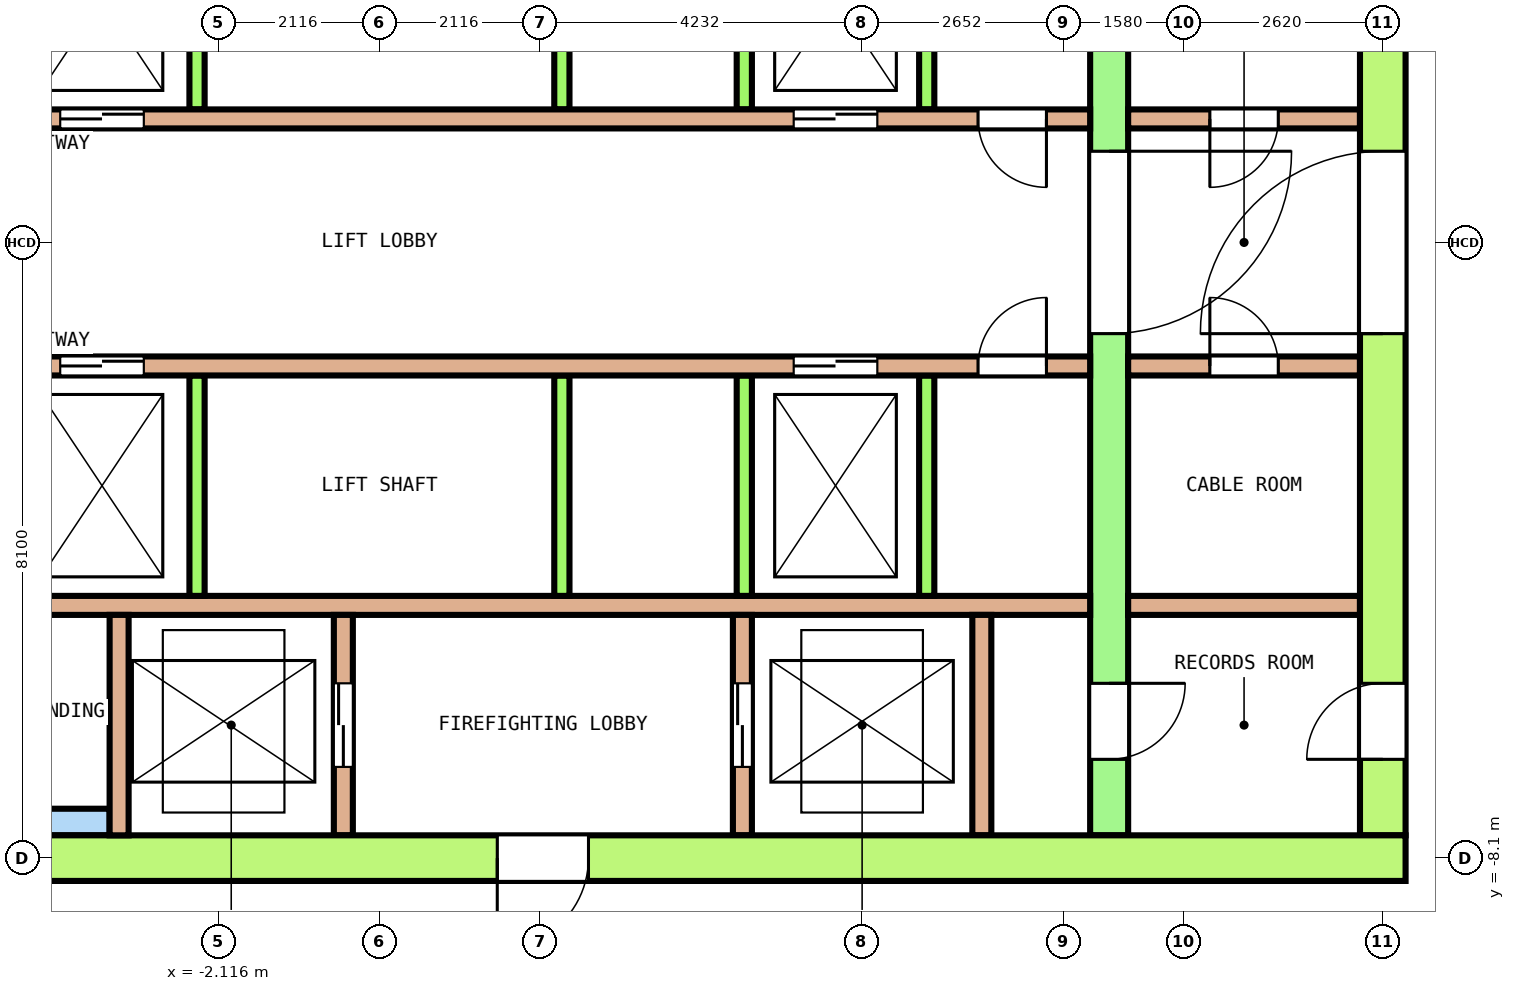
"""IFC4 building model, lengths in metres.
Left out: names, types, materials, properties, quantities, classifications, styles, units other than length and angle.
Written with IfcOpenShell. Run it as: python <this file> out.ifc"""

import sys

from ifc_helpers import new_model, si_unit, direction, frame, frame_2d, origin, place, context, subcontext, project, spatial, rectangle, extrude, element, fill, save


model = new_model("IFC4")
c1 = context("Model", 3, precision=1e-05, world=origin(), true_north=direction((0.0, 1.0)))
c2 = subcontext(c1, "Body", "Model", "MODEL_VIEW")
j1 = project(units=[si_unit("LENGTHUNIT", "METRE"), si_unit("PLANEANGLEUNIT", "RADIAN")], contexts=[c1])
p1 = place(None, origin())
s1 = spatial("IfcSite", under=j1, at=p1, CompositionType="ELEMENT")
p2 = place(p1, origin())
s2 = spatial("IfcBuilding", under=s1, at=p2, CompositionType="ELEMENT")
p3 = place(p2, frame((0.0, 0.0, 219.4)))
s3 = spatial("IfcBuildingStorey", under=s2, at=p3, CompositionType="ELEMENT", Elevation=219.4)
p4 = place(p3, frame((-13.5, -8.1, 0.0), z_axis=(0.0, 0.0, 1.0), x_axis=(1.0, 0.0, 0.0)))
e1 = element("IfcWall", 1, at=p4, inside=s3, PredefinedType="SHEAR", context=c2, shape_type="SweptSolid", body=[
    extrude(rectangle(XDim=27.0, YDim=0.6, at=frame_2d((13.5, 0.0))), origin(), (0.0, 0.0, 1.0), 3.7),
])
p5 = place(p4, frame((15.05, 0.0, 0.0)))
e2 = element("IfcOpeningElement", 2, at=p5, cuts=e1, PredefinedType="OPENING", context=c2, shape_type="SweptSolid", body=[
    extrude(rectangle(XDim=1.2, YDim=2.1, at=frame_2d((0.6, 1.05))), frame((0.0, 0.31, 0.0), z_axis=(0.0, -1.0, 0.0), x_axis=(1.0, 0.0, 0.0)), (0.0, 0.0, 1.0), 0.62),
])
p6 = place(p3, frame((13.2, -7.8, 0.0), z_axis=(0.0, 0.0, 1.0), x_axis=(0.0, 1.0, 0.0)))
e3 = element("IfcWall", 3, at=p6, inside=s3, PredefinedType="SHEAR", context=c2, shape_type="SweptSolid", body=[
    extrude(rectangle(XDim=15.6, YDim=0.6, at=frame_2d((7.8, 0.0))), origin(), (0.0, 0.0, 1.0), 3.7),
])
p7 = place(p6, frame((6.6, 0.0, 0.0)))
e4 = element("IfcOpeningElement", 4, at=p7, cuts=e3, PredefinedType="OPENING", context=c2, shape_type="SweptSolid", body=[
    extrude(rectangle(XDim=2.4, YDim=2.1, at=frame_2d((1.2, 1.05))), frame((0.0, 0.31, 0.0), z_axis=(0.0, -1.0, 0.0), x_axis=(1.0, 0.0, 0.0)), (0.0, 0.0, 1.0), 0.62),
])
p8 = place(p6, frame((13.5, 0.0, 0.0)))
e5 = element("IfcOpeningElement", 5, at=p8, cuts=e3, PredefinedType="OPENING", context=c2, shape_type="SweptSolid", body=[
    extrude(rectangle(XDim=1.2, YDim=2.1, at=frame_2d((0.6, 1.05))), frame((0.0, 0.31, 0.0), z_axis=(0.0, -1.0, 0.0), x_axis=(1.0, 0.0, 0.0)), (0.0, 0.0, 1.0), 0.62),
])
p9 = place(p6, frame((1.0, 0.0, 0.0)))
e6 = element("IfcOpeningElement", 6, at=p9, cuts=e3, PredefinedType="OPENING", context=c2, shape_type="SweptSolid", body=[
    extrude(rectangle(XDim=1.0, YDim=2.1, at=frame_2d((0.5, 1.05))), frame((0.0, 0.31, 0.0), z_axis=(0.0, -1.0, 0.0), x_axis=(1.0, 0.0, 0.0)), (0.0, 0.0, 1.0), 0.62),
])
p10 = place(p3, frame((9.6, -7.8, 0.0), z_axis=(0.0, 0.0, 1.0), x_axis=(0.0, 1.0, 0.0)))
e7 = element("IfcWall", 7, at=p10, inside=s3, PredefinedType="SHEAR", context=c2, shape_type="SweptSolid", body=[
    extrude(rectangle(XDim=15.6, YDim=0.5, at=frame_2d((7.8, 0.0))), origin(), (0.0, 0.0, 1.0), 3.7),
])
p11 = place(p10, frame((6.6, 0.0, 0.0)))
e8 = element("IfcOpeningElement", 8, at=p11, cuts=e7, PredefinedType="OPENING", context=c2, shape_type="SweptSolid", body=[
    extrude(rectangle(XDim=2.4, YDim=2.1, at=frame_2d((1.2, 1.05))), frame((0.0, 0.26, 0.0), z_axis=(0.0, -1.0, 0.0), x_axis=(1.0, 0.0, 0.0)), (0.0, 0.0, 1.0), 0.52),
])
p12 = place(p10, frame((13.5, 0.0, 0.0)))
e9 = element("IfcOpeningElement", 9, at=p12, cuts=e7, PredefinedType="OPENING", context=c2, shape_type="SweptSolid", body=[
    extrude(rectangle(XDim=1.2, YDim=2.1, at=frame_2d((0.6, 1.05))), frame((0.0, 0.26, 0.0), z_axis=(0.0, -1.0, 0.0), x_axis=(1.0, 0.0, 0.0)), (0.0, 0.0, 1.0), 0.52),
])
p13 = place(p10, frame((1.0, 0.0, 0.0)))
e10 = element("IfcOpeningElement", 10, at=p13, cuts=e7, PredefinedType="OPENING", context=c2, shape_type="SweptSolid", body=[
    extrude(rectangle(XDim=1.0, YDim=2.1, at=frame_2d((0.5, 1.05))), frame((0.0, 0.26, 0.0), z_axis=(0.0, -1.0, 0.0), x_axis=(1.0, 0.0, 0.0)), (0.0, 0.0, 1.0), 0.52),
])
p14 = place(p3, frame((-9.35, 1.625, 0.0), z_axis=(0.0, 0.0, 1.0), x_axis=(1.0, 0.0, 0.0)))
e11 = element("IfcWall", 11, at=p14, inside=s3, PredefinedType="SOLIDWALL", context=c2, shape_type="SweptSolid", body=[
    extrude(rectangle(XDim=18.7, YDim=0.25, at=frame_2d((9.35, 0.0))), origin(), (0.0, 0.0, 1.0), 3.7),
])
p15 = place(p14, frame((2.85, 0.0, 0.0)))
e12 = element("IfcOpeningElement", 12, at=p15, cuts=e11, PredefinedType="OPENING", context=c2, shape_type="SweptSolid", body=[
    extrude(rectangle(XDim=1.1, YDim=2.1, at=frame_2d((0.55, 1.05))), frame((0.0, 0.135, 0.0), z_axis=(0.0, -1.0, 0.0), x_axis=(1.0, 0.0, 0.0)), (0.0, 0.0, 1.0), 0.27),
])
p16 = place(p14, frame((5.15, 0.0, 0.0)))
e13 = element("IfcOpeningElement", 13, at=p16, cuts=e11, PredefinedType="OPENING", context=c2, shape_type="SweptSolid", body=[
    extrude(rectangle(XDim=1.1, YDim=2.1, at=frame_2d((0.55, 1.05))), frame((0.0, 0.135, 0.0), z_axis=(0.0, -1.0, 0.0), x_axis=(1.0, 0.0, 0.0)), (0.0, 0.0, 1.0), 0.27),
])
p17 = place(p14, frame((14.8, 0.0, 0.0)))
e14 = element("IfcOpeningElement", 14, at=p17, cuts=e11, PredefinedType="OPENING", context=c2, shape_type="SweptSolid", body=[
    extrude(rectangle(XDim=1.1, YDim=2.1, at=frame_2d((0.55, 1.05))), frame((0.0, 0.135, 0.0), z_axis=(0.0, -1.0, 0.0), x_axis=(1.0, 0.0, 0.0)), (0.0, 0.0, 1.0), 0.27),
])
p18 = place(p14, frame((0.575, 0.0, 0.0)))
e15 = element("IfcOpeningElement", 15, at=p18, cuts=e11, PredefinedType="OPENING", context=c2, shape_type="SweptSolid", body=[
    extrude(rectangle(XDim=0.9, YDim=2.1, at=frame_2d((0.45, 1.05))), frame((0.0, 0.135, 0.0), z_axis=(0.0, -1.0, 0.0), x_axis=(1.0, 0.0, 0.0)), (0.0, 0.0, 1.0), 0.27),
])
p19 = place(p14, frame((17.225, 0.0, 0.0)))
e16 = element("IfcOpeningElement", 16, at=p19, cuts=e11, PredefinedType="OPENING", context=c2, shape_type="SweptSolid", body=[
    extrude(rectangle(XDim=0.9, YDim=2.1, at=frame_2d((0.45, 1.05))), frame((0.0, 0.135, 0.0), z_axis=(0.0, -1.0, 0.0), x_axis=(1.0, 0.0, 0.0)), (0.0, 0.0, 1.0), 0.27),
])
p20 = place(p3, frame((9.85, 1.625, 0.0), z_axis=(0.0, 0.0, 1.0), x_axis=(1.0, 0.0, 0.0)))
e17 = element("IfcWall", 17, at=p20, inside=s3, PredefinedType="SOLIDWALL", context=c2, shape_type="SweptSolid", body=[
    extrude(rectangle(XDim=3.05, YDim=0.25, at=frame_2d((1.525, 0.0))), origin(), (0.0, 0.0, 1.0), 3.7),
])
p21 = place(p20, frame((1.075, 0.0, 0.0)))
e18 = element("IfcOpeningElement", 18, at=p21, cuts=e17, PredefinedType="OPENING", context=c2, shape_type="SweptSolid", body=[
    extrude(rectangle(XDim=0.9, YDim=2.1, at=frame_2d((0.45, 1.05))), frame((0.0, 0.135, 0.0), z_axis=(0.0, -1.0, 0.0), x_axis=(1.0, 0.0, 0.0)), (0.0, 0.0, 1.0), 0.27),
])
for number, where, z_axis, x_axis in (
    (19, (-2.4, 1.75, 0.0), (0.0, 0.0, 1.0), (0.0, 1.0, 0.0)),
    (20, (2.4, 1.75, 0.0), (0.0, 0.0, 1.0), (0.0, 1.0, 0.0)),
    (21, (4.8, 1.75, 0.0), (0.0, 0.0, 1.0), (0.0, 1.0, 0.0)),
    (22, (7.2, 1.75, 0.0), (0.0, 0.0, 1.0), (0.0, 1.0, 0.0)),
):
    element("IfcWall", number, at=place(p3, frame(where, z_axis=z_axis, x_axis=x_axis)), inside=s3, PredefinedType="SOLIDWALL", context=c2, shape_type="SweptSolid", body=[
        extrude(rectangle(XDim=2.9, YDim=0.2, at=frame_2d((1.45, 0.0))), origin(), (0.0, 0.0, 1.0), 3.7),
    ])
p22 = place(p3, frame((-9.35, -1.625, 0.0), z_axis=(0.0, 0.0, 1.0), x_axis=(1.0, 0.0, 0.0)))
e23 = element("IfcWall", 23, at=p22, inside=s3, PredefinedType="SOLIDWALL", context=c2, shape_type="SweptSolid", body=[
    extrude(rectangle(XDim=18.7, YDim=0.25, at=frame_2d((9.35, 0.0))), origin(), (0.0, 0.0, 1.0), 3.7),
])
p23 = place(p22, frame((2.85, 0.0, 0.0)))
e24 = element("IfcOpeningElement", 24, at=p23, cuts=e23, PredefinedType="OPENING", context=c2, shape_type="SweptSolid", body=[
    extrude(rectangle(XDim=1.1, YDim=2.1, at=frame_2d((0.55, 1.05))), frame((0.0, 0.135, 0.0), z_axis=(0.0, -1.0, 0.0), x_axis=(1.0, 0.0, 0.0)), (0.0, 0.0, 1.0), 0.27),
])
p24 = place(p22, frame((5.15, 0.0, 0.0)))
e25 = element("IfcOpeningElement", 25, at=p24, cuts=e23, PredefinedType="OPENING", context=c2, shape_type="SweptSolid", body=[
    extrude(rectangle(XDim=1.1, YDim=2.1, at=frame_2d((0.55, 1.05))), frame((0.0, 0.135, 0.0), z_axis=(0.0, -1.0, 0.0), x_axis=(1.0, 0.0, 0.0)), (0.0, 0.0, 1.0), 0.27),
])
p25 = place(p22, frame((14.8, 0.0, 0.0)))
e26 = element("IfcOpeningElement", 26, at=p25, cuts=e23, PredefinedType="OPENING", context=c2, shape_type="SweptSolid", body=[
    extrude(rectangle(XDim=1.1, YDim=2.1, at=frame_2d((0.55, 1.05))), frame((0.0, 0.135, 0.0), z_axis=(0.0, -1.0, 0.0), x_axis=(1.0, 0.0, 0.0)), (0.0, 0.0, 1.0), 0.27),
])
p26 = place(p22, frame((0.575, 0.0, 0.0)))
e27 = element("IfcOpeningElement", 27, at=p26, cuts=e23, PredefinedType="OPENING", context=c2, shape_type="SweptSolid", body=[
    extrude(rectangle(XDim=0.9, YDim=2.1, at=frame_2d((0.45, 1.05))), frame((0.0, 0.135, 0.0), z_axis=(0.0, -1.0, 0.0), x_axis=(1.0, 0.0, 0.0)), (0.0, 0.0, 1.0), 0.27),
])
p27 = place(p22, frame((17.225, 0.0, 0.0)))
e28 = element("IfcOpeningElement", 28, at=p27, cuts=e23, PredefinedType="OPENING", context=c2, shape_type="SweptSolid", body=[
    extrude(rectangle(XDim=0.9, YDim=2.1, at=frame_2d((0.45, 1.05))), frame((0.0, 0.135, 0.0), z_axis=(0.0, -1.0, 0.0), x_axis=(1.0, 0.0, 0.0)), (0.0, 0.0, 1.0), 0.27),
])
p28 = place(p3, frame((9.85, -1.625, 0.0), z_axis=(0.0, 0.0, 1.0), x_axis=(1.0, 0.0, 0.0)))
e29 = element("IfcWall", 29, at=p28, inside=s3, PredefinedType="SOLIDWALL", context=c2, shape_type="SweptSolid", body=[
    extrude(rectangle(XDim=3.05, YDim=0.25, at=frame_2d((1.525, 0.0))), origin(), (0.0, 0.0, 1.0), 3.7),
])
p29 = place(p28, frame((1.075, 0.0, 0.0)))
e30 = element("IfcOpeningElement", 30, at=p29, cuts=e29, PredefinedType="OPENING", context=c2, shape_type="SweptSolid", body=[
    extrude(rectangle(XDim=0.9, YDim=2.1, at=frame_2d((0.45, 1.05))), frame((0.0, 0.135, 0.0), z_axis=(0.0, -1.0, 0.0), x_axis=(1.0, 0.0, 0.0)), (0.0, 0.0, 1.0), 0.27),
])
p30 = place(p3, frame((-9.35, -4.775, 0.0), z_axis=(0.0, 0.0, 1.0), x_axis=(1.0, 0.0, 0.0)))
e31 = element("IfcWall", 31, at=p30, inside=s3, PredefinedType="SOLIDWALL", context=c2, shape_type="SweptSolid", body=[
    extrude(rectangle(XDim=18.7, YDim=0.25, at=frame_2d((9.35, 0.0))), origin(), (0.0, 0.0, 1.0), 3.7),
])
p31 = place(p3, frame((9.85, -4.775, 0.0), z_axis=(0.0, 0.0, 1.0), x_axis=(1.0, 0.0, 0.0)))
e32 = element("IfcWall", 32, at=p31, inside=s3, PredefinedType="SOLIDWALL", context=c2, shape_type="SweptSolid", body=[
    extrude(rectangle(XDim=3.05, YDim=0.25, at=frame_2d((1.525, 0.0))), origin(), (0.0, 0.0, 1.0), 3.7),
])
for number, where, z_axis, x_axis in (
    (33, (-2.4, -4.65, 0.0), (0.0, 0.0, 1.0), (0.0, 1.0, 0.0)),
    (34, (2.4, -4.65, 0.0), (0.0, 0.0, 1.0), (0.0, 1.0, 0.0)),
    (35, (4.8, -4.65, 0.0), (0.0, 0.0, 1.0), (0.0, 1.0, 0.0)),
    (36, (7.2, -4.65, 0.0), (0.0, 0.0, 1.0), (0.0, 1.0, 0.0)),
):
    element("IfcWall", number, at=place(p3, frame(where, z_axis=z_axis, x_axis=x_axis)), inside=s3, PredefinedType="SOLIDWALL", context=c2, shape_type="SweptSolid", body=[
        extrude(rectangle(XDim=2.9, YDim=0.2, at=frame_2d((1.45, 0.0))), origin(), (0.0, 0.0, 1.0), 3.7),
    ])
p32 = place(p3, frame((-9.35, -7.625, 0.0), z_axis=(0.0, 0.0, 1.0), x_axis=(1.0, 0.0, 0.0)))
e37 = element("IfcWall", 37, at=p32, inside=s3, PredefinedType="SOLIDWALL", context=c2, shape_type="SweptSolid", body=[
    extrude(rectangle(XDim=5.8, YDim=0.35, at=frame_2d((2.9, 0.0))), origin(), (0.0, 0.0, 1.0), 3.7),
])
p33 = place(p3, frame((-3.425, -7.8, 0.0), z_axis=(0.0, 0.0, 1.0), x_axis=(0.0, 1.0, 0.0)))
e38 = element("IfcWall", 38, at=p33, inside=s3, PredefinedType="SOLIDWALL", context=c2, shape_type="SweptSolid", body=[
    extrude(rectangle(XDim=2.9, YDim=0.25, at=frame_2d((1.45, 0.0))), origin(), (0.0, 0.0, 1.0), 3.7),
])
p34 = place(p3, frame((-0.475, -7.8, 0.0), z_axis=(0.0, 0.0, 1.0), x_axis=(0.0, 1.0, 0.0)))
e39 = element("IfcWall", 39, at=p34, inside=s3, PredefinedType="SOLIDWALL", context=c2, shape_type="SweptSolid", body=[
    extrude(rectangle(XDim=2.9, YDim=0.25, at=frame_2d((1.45, 0.0))), origin(), (0.0, 0.0, 1.0), 3.7),
])
p35 = place(p34, frame((0.9, 0.0, 0.0)))
e40 = element("IfcOpeningElement", 40, at=p35, cuts=e39, PredefinedType="OPENING", context=c2, shape_type="SweptSolid", body=[
    extrude(rectangle(XDim=1.1, YDim=2.1, at=frame_2d((0.55, 1.05))), frame((0.0, 0.135, 0.0), z_axis=(0.0, -1.0, 0.0), x_axis=(1.0, 0.0, 0.0)), (0.0, 0.0, 1.0), 0.27),
])
p36 = place(p3, frame((4.775, -7.8, 0.0), z_axis=(0.0, 0.0, 1.0), x_axis=(0.0, 1.0, 0.0)))
e41 = element("IfcWall", 41, at=p36, inside=s3, PredefinedType="SOLIDWALL", context=c2, shape_type="SweptSolid", body=[
    extrude(rectangle(XDim=2.9, YDim=0.25, at=frame_2d((1.45, 0.0))), origin(), (0.0, 0.0, 1.0), 3.7),
])
p37 = place(p36, frame((0.9, 0.0, 0.0)))
e42 = element("IfcOpeningElement", 42, at=p37, cuts=e41, PredefinedType="OPENING", context=c2, shape_type="SweptSolid", body=[
    extrude(rectangle(XDim=1.1, YDim=2.1, at=frame_2d((0.55, 1.05))), frame((0.0, 0.135, 0.0), z_axis=(0.0, -1.0, 0.0), x_axis=(1.0, 0.0, 0.0)), (0.0, 0.0, 1.0), 0.27),
])
p38 = place(p3, frame((7.925, -7.8, 0.0), z_axis=(0.0, 0.0, 1.0), x_axis=(0.0, 1.0, 0.0)))
e43 = element("IfcWall", 43, at=p38, inside=s3, PredefinedType="SOLIDWALL", context=c2, shape_type="SweptSolid", body=[
    extrude(rectangle(XDim=2.9, YDim=0.25, at=frame_2d((1.45, 0.0))), origin(), (0.0, 0.0, 1.0), 3.7),
])
p39 = place(p16, origin())
e44 = element("IfcDoor", 44, at=p39, inside=s3, OperationType="DOUBLE_DOOR_SLIDING", PredefinedType="DOOR", context=c2, shape_type="SweptSolid", body=[
    extrude(rectangle(XDim=1.1, YDim=2.1, at=frame_2d((0.55, 1.05))), frame((0.0, 0.075, 0.0), z_axis=(0.0, -1.0, 0.0), x_axis=(1.0, 0.0, 0.0)), (0.0, 0.0, 1.0), 0.15),
])
fill(e13, e44)
p40 = place(p17, origin())
e45 = element("IfcDoor", 45, at=p40, inside=s3, OperationType="DOUBLE_DOOR_SLIDING", PredefinedType="DOOR", context=c2, shape_type="SweptSolid", body=[
    extrude(rectangle(XDim=1.1, YDim=2.1, at=frame_2d((0.55, 1.05))), frame((0.0, 0.075, 0.0), z_axis=(0.0, -1.0, 0.0), x_axis=(1.0, 0.0, 0.0)), (0.0, 0.0, 1.0), 0.15),
])
fill(e14, e45)
p41 = place(p24, origin())
e46 = element("IfcDoor", 46, at=p41, inside=s3, OperationType="DOUBLE_DOOR_SLIDING", PredefinedType="DOOR", context=c2, shape_type="SweptSolid", body=[
    extrude(rectangle(XDim=1.1, YDim=2.1, at=frame_2d((0.55, 1.05))), frame((0.0, 0.075, 0.0), z_axis=(0.0, -1.0, 0.0), x_axis=(1.0, 0.0, 0.0)), (0.0, 0.0, 1.0), 0.15),
])
fill(e25, e46)
p42 = place(p25, origin())
e47 = element("IfcDoor", 47, at=p42, inside=s3, OperationType="DOUBLE_DOOR_SLIDING", PredefinedType="DOOR", context=c2, shape_type="SweptSolid", body=[
    extrude(rectangle(XDim=1.1, YDim=2.1, at=frame_2d((0.55, 1.05))), frame((0.0, 0.075, 0.0), z_axis=(0.0, -1.0, 0.0), x_axis=(1.0, 0.0, 0.0)), (0.0, 0.0, 1.0), 0.15),
])
fill(e26, e47)
p43 = place(p35, origin())
e48 = element("IfcDoor", 48, at=p43, inside=s3, OperationType="DOUBLE_DOOR_SLIDING", PredefinedType="DOOR", context=c2, shape_type="SweptSolid", body=[
    extrude(rectangle(XDim=1.1, YDim=2.1, at=frame_2d((0.55, 1.05))), frame((0.0, 0.075, 0.0), z_axis=(0.0, -1.0, 0.0), x_axis=(1.0, 0.0, 0.0)), (0.0, 0.0, 1.0), 0.15),
])
fill(e40, e48)
p44 = place(p37, origin())
e49 = element("IfcDoor", 49, at=p44, inside=s3, OperationType="DOUBLE_DOOR_SLIDING", PredefinedType="DOOR", context=c2, shape_type="SweptSolid", body=[
    extrude(rectangle(XDim=1.1, YDim=2.1, at=frame_2d((0.55, 1.05))), frame((0.0, 0.075, 0.0), z_axis=(0.0, -1.0, 0.0), x_axis=(1.0, 0.0, 0.0)), (0.0, 0.0, 1.0), 0.15),
])
fill(e42, e49)
p45 = place(p11, origin())
e50 = element("IfcDoor", 50, at=p45, inside=s3, OperationType="DOUBLE_DOOR_SINGLE_SWING", PredefinedType="DOOR", context=c2, shape_type="SweptSolid", body=[
    extrude(rectangle(XDim=2.4, YDim=2.1, at=frame_2d((1.2, 1.05))), frame((0.0, 0.2, 0.0), z_axis=(0.0, -1.0, 0.0), x_axis=(1.0, 0.0, 0.0)), (0.0, 0.0, 1.0), 0.4),
])
fill(e8, e50)
p46 = place(p7, origin())
e51 = element("IfcDoor", 51, at=p46, inside=s3, OperationType="DOUBLE_DOOR_SINGLE_SWING", PredefinedType="DOOR", context=c2, shape_type="SweptSolid", body=[
    extrude(rectangle(XDim=2.4, YDim=2.1, at=frame_2d((1.2, 1.05))), frame((0.0, 0.25, 0.0), z_axis=(0.0, -1.0, 0.0), x_axis=(1.0, 0.0, 0.0)), (0.0, 0.0, 1.0), 0.5),
])
fill(e4, e51)
p47 = place(p5, origin())
e52 = element("IfcDoor", 52, at=p47, inside=s3, OperationType="SINGLE_SWING_RIGHT", PredefinedType="DOOR", context=c2, shape_type="SweptSolid", body=[
    extrude(rectangle(XDim=1.2, YDim=2.1, at=frame_2d((0.6, 1.05))), frame((0.0, 0.25, 0.0), z_axis=(0.0, -1.0, 0.0), x_axis=(1.0, 0.0, 0.0)), (0.0, 0.0, 1.0), 0.5),
])
fill(e2, e52)
p48 = place(p13, origin())
e53 = element("IfcDoor", 53, at=p48, inside=s3, OperationType="SINGLE_SWING_RIGHT", PredefinedType="DOOR", context=c2, shape_type="SweptSolid", body=[
    extrude(rectangle(XDim=1.0, YDim=2.1, at=frame_2d((0.5, 1.05))), frame((0.0, 0.2, 0.0), z_axis=(0.0, -1.0, 0.0), x_axis=(1.0, 0.0, 0.0)), (0.0, 0.0, 1.0), 0.4),
])
fill(e10, e53)
p49 = place(p9, origin())
e54 = element("IfcDoor", 54, at=p49, inside=s3, OperationType="SINGLE_SWING_LEFT", PredefinedType="DOOR", context=c2, shape_type="SweptSolid", body=[
    extrude(rectangle(XDim=1.0, YDim=2.1, at=frame_2d((0.5, 1.05))), frame((0.0, 0.25, 0.0), z_axis=(0.0, -1.0, 0.0), x_axis=(1.0, 0.0, 0.0)), (0.0, 0.0, 1.0), 0.5),
])
fill(e6, e54)
p50 = place(p19, origin())
e55 = element("IfcDoor", 55, at=p50, inside=s3, OperationType="SINGLE_SWING_RIGHT", PredefinedType="DOOR", context=c2, shape_type="SweptSolid", body=[
    extrude(rectangle(XDim=0.9, YDim=2.1, at=frame_2d((0.45, 1.05))), frame((0.0, 0.075, 0.0), z_axis=(0.0, -1.0, 0.0), x_axis=(1.0, 0.0, 0.0)), (0.0, 0.0, 1.0), 0.15),
])
fill(e16, e55)
p51 = place(p21, origin())
e56 = element("IfcDoor", 56, at=p51, inside=s3, OperationType="SINGLE_SWING_LEFT", PredefinedType="DOOR", context=c2, shape_type="SweptSolid", body=[
    extrude(rectangle(XDim=0.9, YDim=2.1, at=frame_2d((0.45, 1.05))), frame((0.0, 0.075, 0.0), z_axis=(0.0, -1.0, 0.0), x_axis=(1.0, 0.0, 0.0)), (0.0, 0.0, 1.0), 0.15),
])
fill(e18, e56)
p52 = place(p27, origin())
e57 = element("IfcDoor", 57, at=p52, inside=s3, OperationType="SINGLE_SWING_RIGHT", PredefinedType="DOOR", context=c2, shape_type="SweptSolid", body=[
    extrude(rectangle(XDim=0.9, YDim=2.1, at=frame_2d((0.45, 1.05))), frame((0.0, 0.075, 0.0), z_axis=(0.0, -1.0, 0.0), x_axis=(1.0, 0.0, 0.0)), (0.0, 0.0, 1.0), 0.15),
])
fill(e28, e57)
p53 = place(p29, origin())
e58 = element("IfcDoor", 58, at=p53, inside=s3, OperationType="SINGLE_SWING_LEFT", PredefinedType="DOOR", context=c2, shape_type="SweptSolid", body=[
    extrude(rectangle(XDim=0.9, YDim=2.1, at=frame_2d((0.45, 1.05))), frame((0.0, 0.075, 0.0), z_axis=(0.0, -1.0, 0.0), x_axis=(1.0, 0.0, 0.0)), (0.0, 0.0, 1.0), 0.15),
])
fill(e30, e58)
save(model, sys.argv[1])
